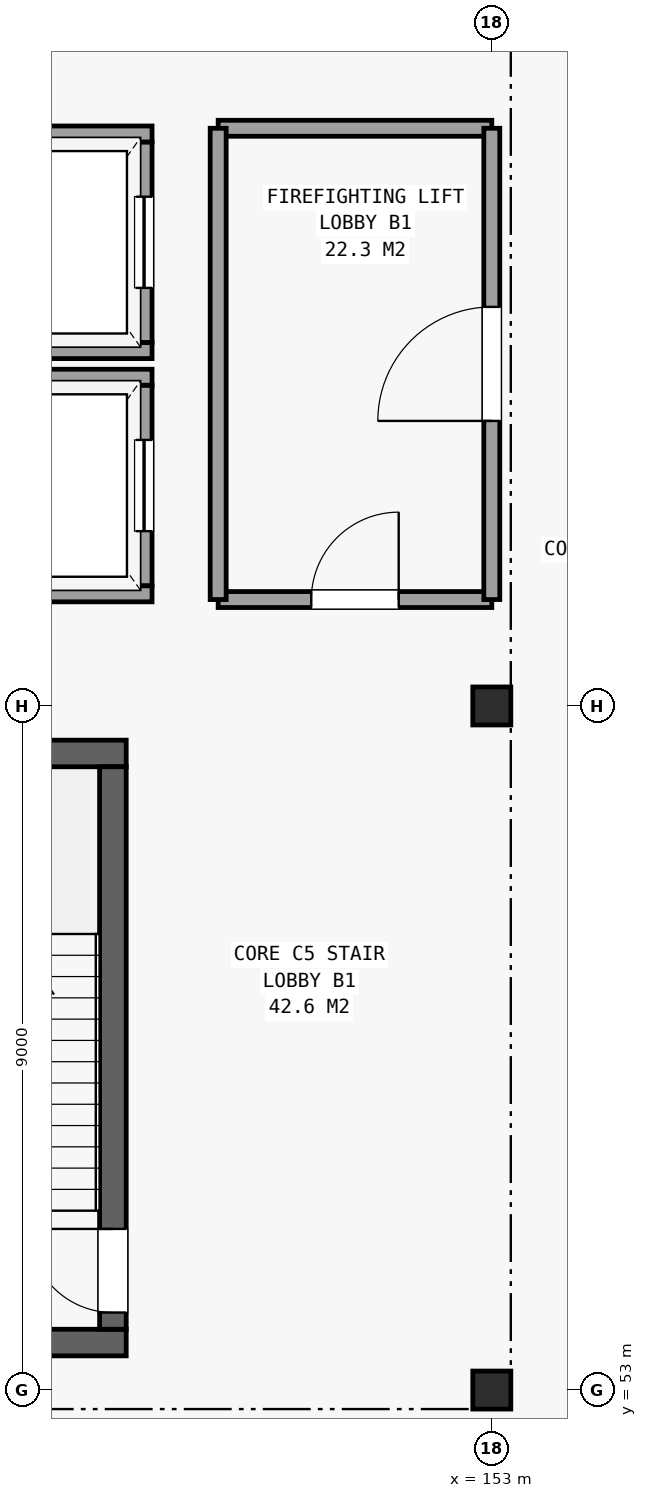
"""IFC4 building model, lengths in metres.
Left out: names, types, materials, properties, quantities, classifications, styles, units other than length and angle.
Written with IfcOpenShell. Run it as: python <this file> out.ifc"""

import sys

from ifc_helpers import new_model, si_unit, direction, frame, frame_2d, origin, origin_2d, place, context, subcontext, project, spatial, rectangle, hollow_rectangle, extrude, element, fill, save


model = new_model("IFC4")
c1 = context("Model", 3, precision=1e-05, world=origin(), true_north=direction((0.0, 1.0)))
c2 = subcontext(c1, "Body", "Model", "MODEL_VIEW")
j1 = project(units=[si_unit("LENGTHUNIT", "METRE"), si_unit("PLANEANGLEUNIT", "RADIAN")], contexts=[c1])
p1 = place(None, origin())
s1 = spatial("IfcSite", under=j1, at=p1, CompositionType="ELEMENT")
p2 = place(p1, origin())
s2 = spatial("IfcBuilding", under=s1, at=p2, CompositionType="ELEMENT")
p3 = place(p2, frame((0.0, 0.0, -4.8)))
s3 = spatial("IfcBuildingStorey", under=s2, at=p3, CompositionType="ELEMENT", Elevation=-4.8)
for number, where, z_axis, x_axis in (
    (1, (153.0, 53.0, 0.0), (0.0, 0.0, 1.0), (1.0, 0.0, 0.0)),
    (2, (153.0, 62.0, 0.0), (0.0, 0.0, 1.0), (1.0, 0.0, 0.0)),
):
    element("IfcColumn", number, at=place(p3, frame(where, z_axis=z_axis, x_axis=x_axis)), inside=s3, PredefinedType="COLUMN", context=c2, shape_type="SweptSolid", body=[
        extrude(hollow_rectangle(XDim=0.5, YDim=0.5, WallThickness=0.025, at=origin_2d()), origin(), (0.0, 0.0, 1.0), 4.8),
    ])
for number, where, z_axis, x_axis in (
    (3, (144.21, 53.625, 0.0), (0.0, 0.0, 1.0), (1.0, 0.0, 0.0)),
    (4, (144.21, 61.375, 0.0), (0.0, 0.0, 1.0), (1.0, 0.0, 0.0)),
):
    element("IfcWall", number, at=place(p3, frame(where, z_axis=z_axis, x_axis=x_axis)), inside=s3, PredefinedType="SHEAR", context=c2, shape_type="SweptSolid", body=[
        extrude(rectangle(XDim=3.98, YDim=0.35, at=frame_2d((1.99, 0.0))), origin(), (0.0, 0.0, 1.0), 4.52),
    ])
p4 = place(p3, frame((148.015, 53.8, 0.0), z_axis=(0.0, 0.0, 1.0), x_axis=(0.0, 1.0, 0.0)))
e5 = element("IfcWall", 5, at=p4, inside=s3, PredefinedType="SHEAR", context=c2, shape_type="SweptSolid", body=[
    extrude(rectangle(XDim=7.4, YDim=0.35, at=frame_2d((3.7, 0.0))), origin(), (0.0, 0.0, 1.0), 4.52),
])
p5 = place(p4, frame((0.22, 0.0, 0.0)))
e6 = element("IfcOpeningElement", 6, at=p5, cuts=e5, PredefinedType="OPENING", context=c2, shape_type="SweptSolid", body=[
    extrude(rectangle(XDim=1.1, YDim=2.15, at=frame_2d((0.55, 1.075))), frame((0.0, 0.186, 0.0), z_axis=(0.0, -1.0, 0.0), x_axis=(1.0, 0.0, 0.0)), (0.0, 0.0, 1.0), 0.372),
])
p6 = place(p3, frame((148.425, 63.58, 0.0), z_axis=(0.0, 0.0, 1.0), x_axis=(0.0, 1.0, 0.0)))
e7 = element("IfcWall", 7, at=p6, inside=s3, PredefinedType="PARTITIONING", context=c2, shape_type="SweptSolid", body=[
    extrude(rectangle(XDim=2.64, YDim=0.21, at=frame_2d((1.32, 0.0))), origin(), (0.0, 0.0, 1.0), 4.52),
])
p7 = place(p6, frame((0.72, 0.0, 0.0)))
e8 = element("IfcOpeningElement", 8, at=p7, cuts=e7, PredefinedType="OPENING", context=c2, shape_type="SweptSolid", body=[
    extrude(rectangle(XDim=1.2, YDim=2.2, at=frame_2d((0.6, 1.1))), frame((0.0, 0.116, 0.0), z_axis=(0.0, -1.0, 0.0), x_axis=(1.0, 0.0, 0.0)), (0.0, 0.0, 1.0), 0.232),
])
for number, where, z_axis, x_axis in (
    (9, (146.27, 63.475, 0.0), (0.0, 0.0, 1.0), (1.0, 0.0, 0.0)),
    (10, (146.27, 66.325, 0.0), (0.0, 0.0, 1.0), (1.0, 0.0, 0.0)),
):
    element("IfcWall", number, at=place(p3, frame(where, z_axis=z_axis, x_axis=x_axis)), inside=s3, PredefinedType="PARTITIONING", context=c2, shape_type="SweptSolid", body=[
        extrude(rectangle(XDim=2.26, YDim=0.21, at=frame_2d((1.13, 0.0))), origin(), (0.0, 0.0, 1.0), 4.52),
    ])
p8 = place(p3, frame((148.425, 66.78, 0.0), z_axis=(0.0, 0.0, 1.0), x_axis=(0.0, 1.0, 0.0)))
e11 = element("IfcWall", 11, at=p8, inside=s3, PredefinedType="PARTITIONING", context=c2, shape_type="SweptSolid", body=[
    extrude(rectangle(XDim=2.64, YDim=0.21, at=frame_2d((1.32, 0.0))), origin(), (0.0, 0.0, 1.0), 4.52),
])
p9 = place(p8, frame((0.72, 0.0, 0.0)))
e12 = element("IfcOpeningElement", 12, at=p9, cuts=e11, PredefinedType="OPENING", context=c2, shape_type="SweptSolid", body=[
    extrude(rectangle(XDim=1.2, YDim=2.2, at=frame_2d((0.6, 1.1))), frame((0.0, 0.116, 0.0), z_axis=(0.0, -1.0, 0.0), x_axis=(1.0, 0.0, 0.0)), (0.0, 0.0, 1.0), 0.232),
])
for number, where, z_axis, x_axis in (
    (13, (146.27, 66.675, 0.0), (0.0, 0.0, 1.0), (1.0, 0.0, 0.0)),
    (14, (146.27, 69.525, 0.0), (0.0, 0.0, 1.0), (1.0, 0.0, 0.0)),
):
    element("IfcWall", number, at=place(p3, frame(where, z_axis=z_axis, x_axis=x_axis)), inside=s3, PredefinedType="PARTITIONING", context=c2, shape_type="SweptSolid", body=[
        extrude(rectangle(XDim=2.26, YDim=0.21, at=frame_2d((1.13, 0.0))), origin(), (0.0, 0.0, 1.0), 4.52),
    ])
p10 = place(p3, frame((149.4, 63.4, 0.0), z_axis=(0.0, 0.0, 1.0), x_axis=(1.0, 0.0, 0.0)))
e15 = element("IfcWall", 15, at=p10, inside=s3, PredefinedType="PARTITIONING", context=c2, shape_type="SweptSolid", body=[
    extrude(rectangle(XDim=3.6, YDim=0.21, at=frame_2d((1.8, 0.0))), origin(), (0.0, 0.0, 1.0), 3.72),
])
p11 = place(p10, frame((1.225, 0.0, 0.0)))
e16 = element("IfcOpeningElement", 16, at=p11, cuts=e15, PredefinedType="OPENING", context=c2, shape_type="SweptSolid", body=[
    extrude(rectangle(XDim=1.15, YDim=2.2, at=frame_2d((0.575, 1.1))), frame((0.0, 0.116, 0.0), z_axis=(0.0, -1.0, 0.0), x_axis=(1.0, 0.0, 0.0)), (0.0, 0.0, 1.0), 0.232),
])
p12 = place(p3, frame((149.4, 69.6, 0.0), z_axis=(0.0, 0.0, 1.0), x_axis=(1.0, 0.0, 0.0)))
e17 = element("IfcWall", 17, at=p12, inside=s3, PredefinedType="PARTITIONING", context=c2, shape_type="SweptSolid", body=[
    extrude(rectangle(XDim=3.6, YDim=0.21, at=frame_2d((1.8, 0.0))), origin(), (0.0, 0.0, 1.0), 3.72),
])
p13 = place(p3, frame((149.4, 63.4, 0.0), z_axis=(0.0, 0.0, 1.0), x_axis=(0.0, 1.0, 0.0)))
e18 = element("IfcWall", 18, at=p13, inside=s3, PredefinedType="PARTITIONING", context=c2, shape_type="SweptSolid", body=[
    extrude(rectangle(XDim=6.2, YDim=0.21, at=frame_2d((3.1, 0.0))), origin(), (0.0, 0.0, 1.0), 4.52),
])
p14 = place(p3, frame((153.0, 63.4, 0.0), z_axis=(0.0, 0.0, 1.0), x_axis=(0.0, 1.0, 0.0)))
e19 = element("IfcWall", 19, at=p14, inside=s3, PredefinedType="PARTITIONING", context=c2, shape_type="SweptSolid", body=[
    extrude(rectangle(XDim=6.2, YDim=0.21, at=frame_2d((3.1, 0.0))), origin(), (0.0, 0.0, 1.0), 3.72),
])
p15 = place(p14, frame((2.35, 0.0, 0.0)))
e20 = element("IfcOpeningElement", 20, at=p15, cuts=e19, PredefinedType="OPENING", context=c2, shape_type="SweptSolid", body=[
    extrude(rectangle(XDim=1.5, YDim=2.25, at=frame_2d((0.75, 1.125))), frame((0.0, 0.116, 0.0), z_axis=(0.0, -1.0, 0.0), x_axis=(1.0, 0.0, 0.0)), (0.0, 0.0, 1.0), 0.232),
])
p16 = place(p5, origin())
e21 = element("IfcDoor", 21, at=p16, inside=s3, OperationType="SINGLE_SWING_RIGHT", PredefinedType="DOOR", context=c2, shape_type="SweptSolid", body=[
    extrude(rectangle(XDim=1.1, YDim=2.15, at=frame_2d((0.55, 1.075))), frame((0.0, 0.025, 0.0), z_axis=(0.0, -1.0, 0.0), x_axis=(1.0, 0.0, 0.0)), (0.0, 0.0, 1.0), 0.05),
])
fill(e6, e21)
p17 = place(p7, origin())
e22 = element("IfcDoor", 22, at=p17, inside=s3, OperationType="SLIDING_TO_RIGHT", PredefinedType="DOOR", context=c2, shape_type="SweptSolid", body=[
    extrude(rectangle(XDim=1.2, YDim=2.2, at=frame_2d((0.6, 1.1))), frame((0.0, 0.025, 0.0), z_axis=(0.0, -1.0, 0.0), x_axis=(1.0, 0.0, 0.0)), (0.0, 0.0, 1.0), 0.05),
])
fill(e8, e22)
p18 = place(p9, origin())
e23 = element("IfcDoor", 23, at=p18, inside=s3, OperationType="SLIDING_TO_LEFT", PredefinedType="DOOR", context=c2, shape_type="SweptSolid", body=[
    extrude(rectangle(XDim=1.2, YDim=2.2, at=frame_2d((0.6, 1.1))), frame((0.0, 0.025, 0.0), z_axis=(0.0, -1.0, 0.0), x_axis=(1.0, 0.0, 0.0)), (0.0, 0.0, 1.0), 0.05),
])
fill(e12, e23)
p19 = place(p11, origin())
e24 = element("IfcDoor", 24, at=p19, inside=s3, OperationType="SINGLE_SWING_RIGHT", PredefinedType="DOOR", context=c2, shape_type="SweptSolid", body=[
    extrude(rectangle(XDim=1.15, YDim=2.2, at=frame_2d((0.575, 1.1))), frame((0.0, 0.025, 0.0), z_axis=(0.0, -1.0, 0.0), x_axis=(1.0, 0.0, 0.0)), (0.0, 0.0, 1.0), 0.05),
])
fill(e16, e24)
p20 = place(p15, origin())
e25 = element("IfcDoor", 25, at=p20, inside=s3, OperationType="SINGLE_SWING_LEFT", PredefinedType="DOOR", context=c2, shape_type="SweptSolid", body=[
    extrude(rectangle(XDim=1.5, YDim=2.25, at=frame_2d((0.75, 1.125))), frame((0.0, 0.025, 0.0), z_axis=(0.0, -1.0, 0.0), x_axis=(1.0, 0.0, 0.0)), (0.0, 0.0, 1.0), 0.05),
])
fill(e20, e25)
save(model, sys.argv[1])
